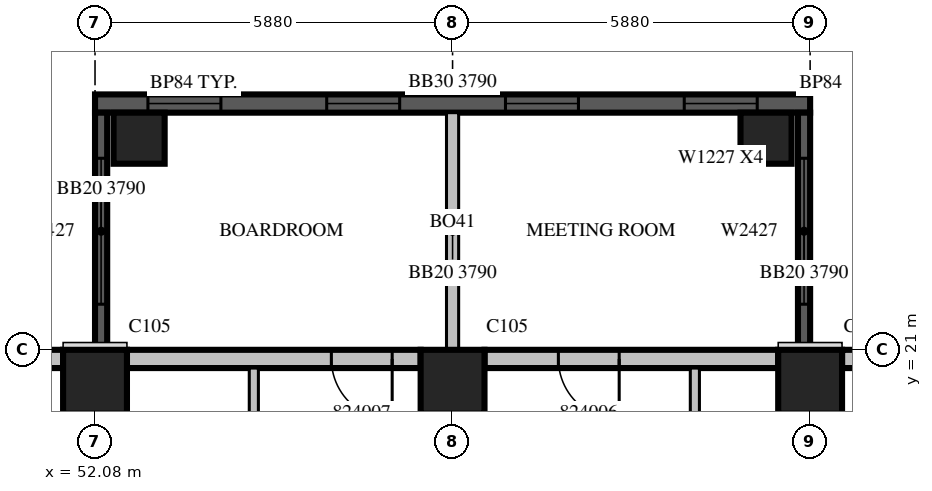
"""IFC4 building model, lengths in metres.
Left out: names, types, materials, properties, quantities, classifications, styles, units other than length and angle.
Written with IfcOpenShell. Run it as: python <this file> out.ifc"""

import sys

from ifc_helpers import new_model, si_unit, direction, frame, frame_2d, origin, origin_2d, place, context, subcontext, project, spatial, rectangle, extrude, source, transform, mapped, element, fill, save


model = new_model("IFC4")
c1 = context("Model", 3, precision=1e-05, world=origin(), true_north=direction((0.0, 1.0)))
c2 = subcontext(c1, "Body", "Model", "MODEL_VIEW")
j1 = project(units=[si_unit("LENGTHUNIT", "METRE"), si_unit("PLANEANGLEUNIT", "RADIAN")], contexts=[c1])
p1 = place(None, origin())
s1 = spatial("IfcSite", under=j1, at=p1, CompositionType="ELEMENT")
p2 = place(p1, origin())
s2 = spatial("IfcBuilding", under=s1, at=p2, CompositionType="ELEMENT")
p3 = place(p2, frame((0.0, 0.0, 111.9)))
s3 = spatial("IfcBuildingStorey", under=s2, at=p3, CompositionType="ELEMENT", Elevation=111.9)
m1 = source(origin(), c2, "Body", "SweptSolid", [
    extrude(rectangle(XDim=1.05, YDim=1.05, at=origin_2d()), origin(), (0.0, 0.0, 1.0), 4.2),
])
for number, where, z_axis, x_axis in (
    (1, (52.08, 20.475, 0.0), (0.0, 0.0, 1.0), (1.0, 0.0, 0.0)),
    (2, (57.96, 20.475, 0.0), (0.0, 0.0, 1.0), (1.0, 0.0, 0.0)),
    (3, (63.84, 20.475, 0.0), (0.0, 0.0, 1.0), (1.0, 0.0, 0.0)),
):
    element("IfcColumn", number, at=place(p3, frame(where, z_axis=z_axis, x_axis=x_axis)), inside=s3, PredefinedType="COLUMN", context=c2, shape_type="MappedRepresentation", body=[
        mapped(m1, transform((0.0, 0.0, 0.0), scale=1.0)),
    ])
m2 = source(origin(), c2, "Body", "SweptSolid", [
    extrude(rectangle(XDim=0.84, YDim=0.84, at=origin_2d()), origin(), (0.0, 0.0, 1.0), 4.6),
])
for number, where, z_axis, x_axis in (
    (4, (52.805, 24.48, -0.4), (0.0, 0.0, 1.0), (1.0, 0.0, 0.0)),
    (5, (63.115, 24.48, -0.4), (0.0, 0.0, 1.0), (1.0, 0.0, 0.0)),
):
    element("IfcColumn", number, at=place(p3, frame(where, z_axis=z_axis, x_axis=x_axis)), inside=s3, PredefinedType="COLUMN", context=c2, shape_type="MappedRepresentation", body=[
        mapped(m2, transform((0.0, 0.0, 0.0), scale=1.0)),
    ])
m3 = source(origin(), c2, "Body", "SweptSolid", [
    extrude(rectangle(XDim=2.835, YDim=0.3, at=frame_2d((1.417, 0.0))), origin(), (0.0, 0.0, 1.0), 3.8),
])
p4 = place(p3, frame((67.2, 20.85, 0.0), z_axis=(0.0, 0.0, 1.0), x_axis=(-1.0, 0.0, 0.0)))
e6 = element("IfcWall", 6, at=p4, inside=s3, PredefinedType="STANDARD", context=c2, shape_type="MappedRepresentation", body=[
    mapped(m3, transform((0.0, 0.0, 0.0), scale=1.0)),
])
m4 = source(origin(), c2, "Body", "SweptSolid", [
    extrude(rectangle(XDim=4.83, YDim=0.3, at=frame_2d((2.415, 0.0))), origin(), (0.0, 0.0, 1.0), 3.8),
])
p5 = place(p3, frame((63.315, 20.85, 0.0), z_axis=(0.0, 0.0, 1.0), x_axis=(-1.0, 0.0, 0.0)))
e7 = element("IfcWall", 7, at=p5, inside=s3, PredefinedType="STANDARD", context=c2, shape_type="MappedRepresentation", body=[
    mapped(m4, transform((0.0, 0.0, 0.0), scale=1.0)),
])
m5 = source(origin(), c2, "Body", "SweptSolid", [
    extrude(rectangle(XDim=1.0, YDim=2.1, at=frame_2d((0.5, 1.05))), frame((0.0, 0.16, 0.0), z_axis=(0.0, -1.0, 0.0), x_axis=(1.0, 0.0, 0.0)), (0.0, 0.0, 1.0), 0.32),
])
p6 = place(p5, frame((2.615, 0.0, 0.0)))
e8 = element("IfcOpeningElement", 8, at=p6, cuts=e7, PredefinedType="OPENING", context=c2, shape_type="MappedRepresentation", body=[
    mapped(m5, transform((0.0, 0.0, 0.0), scale=1.0)),
])
p7 = place(p3, frame((57.435, 20.85, 0.0), z_axis=(0.0, 0.0, 1.0), x_axis=(-1.0, 0.0, 0.0)))
e9 = element("IfcWall", 9, at=p7, inside=s3, PredefinedType="STANDARD", context=c2, shape_type="MappedRepresentation", body=[
    mapped(m4, transform((0.0, 0.0, 0.0), scale=1.0)),
])
p8 = place(p7, frame((0.468, 0.0, 0.0)))
e10 = element("IfcOpeningElement", 10, at=p8, cuts=e9, PredefinedType="OPENING", context=c2, shape_type="MappedRepresentation", body=[
    mapped(m5, transform((0.0, 0.0, 0.0), scale=1.0)),
])
p9 = place(p3, frame((51.555, 20.85, 0.0), z_axis=(0.0, 0.0, 1.0), x_axis=(-1.0, 0.0, 0.0)))
e11 = element("IfcWall", 11, at=p9, inside=s3, PredefinedType="STANDARD", context=c2, shape_type="MappedRepresentation", body=[
    mapped(m4, transform((0.0, 0.0, 0.0), scale=1.0)),
])
m6 = source(origin(), c2, "Body", "SweptSolid", [
    extrude(rectangle(XDim=1.2, YDim=2.7, at=frame_2d((0.6, 1.35))), frame((0.0, 0.16, 0.0), z_axis=(0.0, -1.0, 0.0), x_axis=(1.0, 0.0, 0.0)), (0.0, 0.0, 1.0), 0.32),
])
p10 = place(p9, frame((3.087, 0.0, 0.6)))
e12 = element("IfcOpeningElement", 12, at=p10, cuts=e11, PredefinedType="OPENING", context=c2, shape_type="MappedRepresentation", body=[
    mapped(m6, transform((0.0, 0.0, 0.0), scale=1.0)),
])
m7 = source(origin(), c2, "Body", "SweptSolid", [
    extrude(rectangle(XDim=11.76, YDim=0.3, at=frame_2d((5.88, 0.0))), origin(), (0.0, 0.0, 1.0), 3.79),
])
p11 = place(p3, frame((63.84, 25.05, 0.0), z_axis=(0.0, 0.0, 1.0), x_axis=(-1.0, 0.0, 0.0)))
e13 = element("IfcWall", 13, at=p11, inside=s3, PredefinedType="SOLIDWALL", context=c2, shape_type="MappedRepresentation", body=[
    mapped(m7, transform((0.0, 0.0, 0.0), scale=1.0)),
])
p12 = place(p11, frame((0.87, 0.0, 0.6)))
e14 = element("IfcOpeningElement", 14, at=p12, cuts=e13, PredefinedType="OPENING", context=c2, shape_type="MappedRepresentation", body=[
    mapped(m6, transform((0.0, 0.0, 0.0), scale=1.0)),
])
p13 = place(p11, frame((3.81, 0.0, 0.6)))
e15 = element("IfcOpeningElement", 15, at=p13, cuts=e13, PredefinedType="OPENING", context=c2, shape_type="MappedRepresentation", body=[
    mapped(m6, transform((0.0, 0.0, 0.0), scale=1.0)),
])
p14 = place(p11, frame((6.75, 0.0, 0.6)))
e16 = element("IfcOpeningElement", 16, at=p14, cuts=e13, PredefinedType="OPENING", context=c2, shape_type="MappedRepresentation", body=[
    mapped(m6, transform((0.0, 0.0, 0.0), scale=1.0)),
])
p15 = place(p11, frame((9.69, 0.0, 0.6)))
e17 = element("IfcOpeningElement", 17, at=p15, cuts=e13, PredefinedType="OPENING", context=c2, shape_type="MappedRepresentation", body=[
    mapped(m6, transform((0.0, 0.0, 0.0), scale=1.0)),
])
m8 = source(origin(), c2, "Body", "SweptSolid", [
    extrude(rectangle(XDim=3.9, YDim=0.2, at=frame_2d((1.95, 0.0))), origin(), (0.0, 0.0, 1.0), 3.79),
])
p16 = place(p3, frame((57.96, 21.0, 0.0), z_axis=(0.0, 0.0, 1.0), x_axis=(0.0, 1.0, 0.0)))
e18 = element("IfcWall", 18, at=p16, inside=s3, PredefinedType="SOLIDWALL", context=c2, shape_type="MappedRepresentation", body=[
    mapped(m8, transform((0.0, 0.0, 0.0), scale=1.0)),
])
m9 = source(origin(), c2, "Body", "SweptSolid", [
    extrude(rectangle(XDim=3.9, YDim=0.2, at=frame_2d((1.95, 0.0))), origin(), (0.0, 0.0, 1.0), 3.79),
])
p17 = place(p3, frame((63.74, 21.0, 0.0), z_axis=(0.0, 0.0, 1.0), x_axis=(0.0, 1.0, 0.0)))
e19 = element("IfcWall", 19, at=p17, inside=s3, PredefinedType="SOLIDWALL", context=c2, shape_type="MappedRepresentation", body=[
    mapped(m9, transform((0.0, 0.0, 0.0), scale=1.0)),
])
m10 = source(origin(), c2, "Body", "SweptSolid", [
    extrude(rectangle(XDim=2.4, YDim=2.7, at=frame_2d((1.2, 1.35))), frame((0.0, 0.11, 0.0), z_axis=(0.0, -1.0, 0.0), x_axis=(1.0, 0.0, 0.0)), (0.0, 0.0, 1.0), 0.22),
])
p18 = place(p17, frame((0.75, 0.0, 0.6)))
e20 = element("IfcOpeningElement", 20, at=p18, cuts=e19, PredefinedType="OPENING", context=c2, shape_type="MappedRepresentation", body=[
    mapped(m10, transform((0.0, 0.0, 0.0), scale=1.0)),
])
p19 = place(p3, frame((52.18, 21.0, 0.0), z_axis=(0.0, 0.0, 1.0), x_axis=(0.0, 1.0, 0.0)))
e21 = element("IfcWall", 21, at=p19, inside=s3, PredefinedType="SOLIDWALL", context=c2, shape_type="MappedRepresentation", body=[
    mapped(m9, transform((0.0, 0.0, 0.0), scale=1.0)),
])
p20 = place(p19, frame((0.75, 0.0, 0.6)))
e22 = element("IfcOpeningElement", 22, at=p20, cuts=e21, PredefinedType="OPENING", context=c2, shape_type="MappedRepresentation", body=[
    mapped(m10, transform((0.0, 0.0, 0.0), scale=1.0)),
])
m11 = source(origin(), c2, "Body", "SweptSolid", [
    extrude(rectangle(XDim=3.6, YDim=0.15, at=frame_2d((1.8, 0.0))), origin(), (0.0, 0.0, 1.0), 3.8),
])
for number, where, z_axis, x_axis in (
    (23, (54.692, 20.7, 0.0), (0.0, 0.0, 1.0), (0.0, -1.0, 0.0)),
    (24, (61.944, 20.7, 0.0), (0.0, 0.0, 1.0), (0.0, -1.0, 0.0)),
):
    element("IfcWall", number, at=place(p3, frame(where, z_axis=z_axis, x_axis=x_axis)), inside=s3, PredefinedType="PARTITIONING", context=c2, shape_type="MappedRepresentation", body=[
        mapped(m11, transform((0.0, 0.0, 0.0), scale=1.0)),
    ])
m12 = source(origin(), c2, "Body", "SweptSolid", [
    extrude(rectangle(XDim=1.2, YDim=2.7, at=frame_2d((0.6, 1.35))), frame((0.0, 0.03, 0.0), z_axis=(0.0, -1.0, 0.0), x_axis=(1.0, 0.0, 0.0)), (0.0, 0.0, 1.0), 0.06),
])
p21 = place(p12, origin())
e25 = element("IfcWindow", 25, at=p21, inside=s3, PartitioningType="SINGLE_PANEL", PredefinedType="WINDOW", context=c2, shape_type="MappedRepresentation", body=[
    mapped(m12, transform((0.0, 0.0, 0.0), scale=1.0)),
])
fill(e14, e25)
p22 = place(p13, origin())
e26 = element("IfcWindow", 26, at=p22, inside=s3, PartitioningType="SINGLE_PANEL", PredefinedType="WINDOW", context=c2, shape_type="MappedRepresentation", body=[
    mapped(m12, transform((0.0, 0.0, 0.0), scale=1.0)),
])
fill(e15, e26)
p23 = place(p14, origin())
e27 = element("IfcWindow", 27, at=p23, inside=s3, PartitioningType="SINGLE_PANEL", PredefinedType="WINDOW", context=c2, shape_type="MappedRepresentation", body=[
    mapped(m12, transform((0.0, 0.0, 0.0), scale=1.0)),
])
fill(e16, e27)
p24 = place(p15, origin())
e28 = element("IfcWindow", 28, at=p24, inside=s3, PartitioningType="SINGLE_PANEL", PredefinedType="WINDOW", context=c2, shape_type="MappedRepresentation", body=[
    mapped(m12, transform((0.0, 0.0, 0.0), scale=1.0)),
])
fill(e17, e28)
m13 = source(origin(), c2, "Body", "SweptSolid", [
    extrude(rectangle(XDim=2.4, YDim=2.7, at=frame_2d((1.2, 1.35))), frame((0.0, 0.03, 0.0), z_axis=(0.0, -1.0, 0.0), x_axis=(1.0, 0.0, 0.0)), (0.0, 0.0, 1.0), 0.06),
])
p25 = place(p18, origin())
e29 = element("IfcWindow", 29, at=p25, inside=s3, PartitioningType="SINGLE_PANEL", PredefinedType="WINDOW", context=c2, shape_type="MappedRepresentation", body=[
    mapped(m13, transform((0.0, 0.0, 0.0), scale=1.0)),
])
fill(e20, e29)
p26 = place(p20, origin())
e30 = element("IfcWindow", 30, at=p26, inside=s3, PartitioningType="SINGLE_PANEL", PredefinedType="WINDOW", context=c2, shape_type="MappedRepresentation", body=[
    mapped(m13, transform((0.0, 0.0, 0.0), scale=1.0)),
])
fill(e22, e30)
m14 = source(origin(), c2, "Body", "SweptSolid", [
    extrude(rectangle(XDim=1.0, YDim=2.1, at=frame_2d((0.5, 1.05))), frame((0.0, 0.025, 0.0), z_axis=(0.0, -1.0, 0.0), x_axis=(1.0, 0.0, 0.0)), (0.0, 0.0, 1.0), 0.05),
])
p27 = place(p6, origin())
e31 = element("IfcDoor", 31, at=p27, inside=s3, OperationType="SINGLE_SWING_LEFT", PredefinedType="DOOR", context=c2, shape_type="MappedRepresentation", body=[
    mapped(m14, transform((0.0, 0.0, 0.0), scale=1.0)),
])
fill(e8, e31)
p28 = place(p8, origin())
e32 = element("IfcDoor", 32, at=p28, inside=s3, OperationType="SINGLE_SWING_LEFT", PredefinedType="DOOR", context=c2, shape_type="MappedRepresentation", body=[
    mapped(m14, transform((0.0, 0.0, 0.0), scale=1.0)),
])
fill(e10, e32)
save(model, sys.argv[1])
